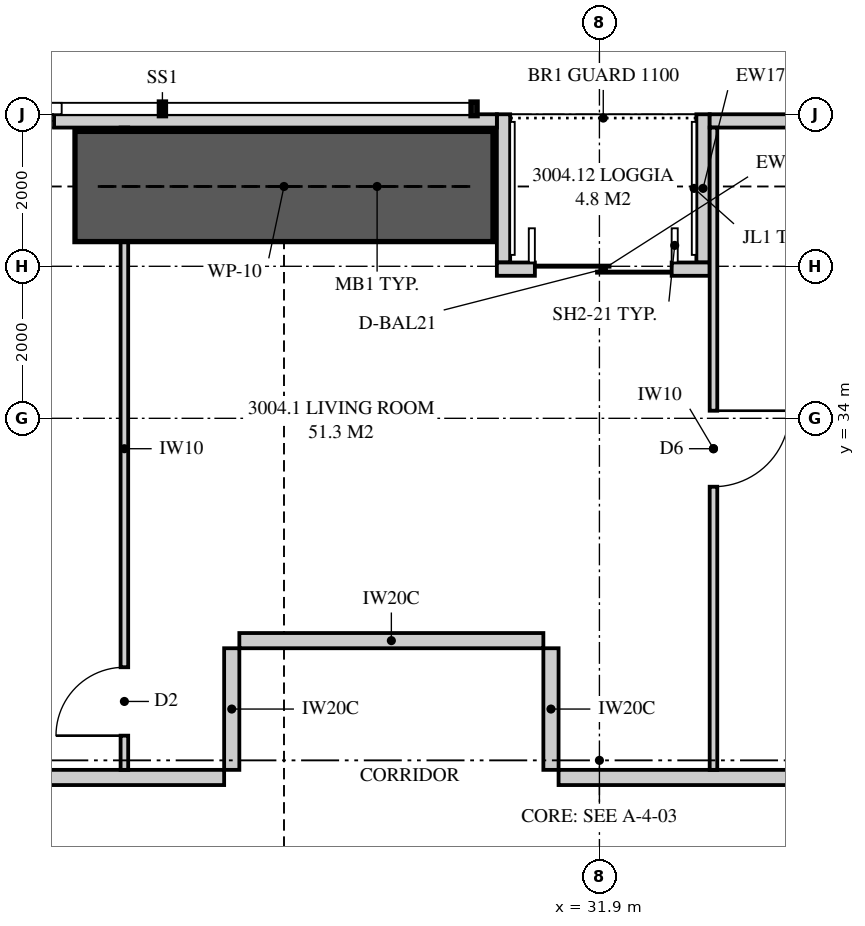
"""IFC4 building model, lengths in metres.
Left out: names, types, materials, properties, quantities, classifications, styles, units other than length and angle.
Written with IfcOpenShell. Run it as: python <this file> out.ifc"""

import sys

from ifc_helpers import new_model, si_unit, direction, frame, frame_2d, origin, place, context, subcontext, project, spatial, polyline, rectangle, outline, extrude, element, fill, save


model = new_model("IFC4")
c1 = context("Model", 3, precision=1e-05, world=origin(), true_north=direction((0.0, 1.0)))
c2 = subcontext(c1, "Body", "Model", "MODEL_VIEW")
j1 = project(units=[si_unit("LENGTHUNIT", "METRE"), si_unit("PLANEANGLEUNIT", "RADIAN")], contexts=[c1])
p1 = place(None, origin())
s1 = spatial("IfcSite", under=j1, at=p1, CompositionType="ELEMENT")
p2 = place(p1, origin())
s2 = spatial("IfcBuilding", under=s1, at=p2, CompositionType="ELEMENT")
p3 = place(p2, frame((0.0, 0.0, 111.55)))
s3 = spatial("IfcBuildingStorey", under=s2, at=p3, CompositionType="ELEMENT", Elevation=111.55)
p4 = place(p3, frame((46.449, 37.913, 0.0), z_axis=(0.0, 0.0, 1.0), x_axis=(-1.0, 0.0, 0.0)))
e1 = element("IfcWall", 1, at=p4, inside=s3, PredefinedType="SOLIDWALL", context=c2, shape_type="SweptSolid", body=[
    extrude(outline(polyline([(0.0, 0.0), (13.098, 0.0), (13.098, 2.15), (7.824, 2.15), (7.824, 3.11), (7.666, 3.11), (7.666, 2.15), (7.62, 2.15), (7.62, 3.11), (0.0, 3.11), (0.0, 0.0)])), frame((0.0, 0.087, 0.0), z_axis=(0.0, -1.0, 0.0), x_axis=(1.0, 0.0, 0.0)), (0.0, 0.0, 1.0), 0.175),
])
p5 = place(p4, frame((2.25, 0.0, 0.4)))
e2 = element("IfcOpeningElement", 2, at=p5, cuts=e1, PredefinedType="OPENING", context=c2, shape_type="SweptSolid", body=[
    extrude(rectangle(XDim=1.2, YDim=1.7, at=frame_2d((0.6, 0.85))), frame((0.0, 0.097, 0.0), z_axis=(0.0, -1.0, 0.0), x_axis=(1.0, 0.0, 0.0)), (0.0, 0.0, 1.0), 0.195),
])
p6 = place(p4, frame((10.798, 0.0, 0.4)))
e3 = element("IfcOpeningElement", 3, at=p6, cuts=e1, PredefinedType="OPENING", context=c2, shape_type="SweptSolid", body=[
    extrude(rectangle(XDim=1.2, YDim=1.7, at=frame_2d((0.6, 0.85))), frame((0.0, 0.097, 0.0), z_axis=(0.0, -1.0, 0.0), x_axis=(1.0, 0.0, 0.0)), (0.0, 0.0, 1.0), 0.195),
])
p7 = place(p3, frame((30.551, 37.913, 0.0), z_axis=(0.0, 0.0, 1.0), x_axis=(-1.0, 0.0, 0.0)))
e4 = element("IfcWall", 4, at=p7, inside=s3, PredefinedType="SOLIDWALL", context=c2, shape_type="SweptSolid", body=[
    extrude(outline(polyline([(0.0, 0.0), (21.499, 0.0), (21.499, 3.11), (13.879, 3.11), (13.879, 2.15), (13.834, 2.15), (13.834, 3.11), (13.676, 3.11), (13.676, 2.15), (0.0, 2.15), (0.0, 0.0)])), frame((0.0, 0.087, 0.0), z_axis=(0.0, -1.0, 0.0), x_axis=(1.0, 0.0, 0.0)), (0.0, 0.0, 1.0), 0.175),
])
p8 = place(p7, frame((5.826, 0.0, 0.4)))
e5 = element("IfcOpeningElement", 5, at=p8, cuts=e4, PredefinedType="OPENING", context=c2, shape_type="SweptSolid", body=[
    extrude(rectangle(XDim=1.8, YDim=1.7, at=frame_2d((0.9, 0.85))), frame((0.0, 0.097, 0.0), z_axis=(0.0, -1.0, 0.0), x_axis=(1.0, 0.0, 0.0)), (0.0, 0.0, 1.0), 0.195),
])
p9 = place(p7, frame((8.993, 0.0, 0.4)))
e6 = element("IfcOpeningElement", 6, at=p9, cuts=e4, PredefinedType="OPENING", context=c2, shape_type="SweptSolid", body=[
    extrude(rectangle(XDim=1.8, YDim=1.7, at=frame_2d((0.9, 0.85))), frame((0.0, 0.097, 0.0), z_axis=(0.0, -1.0, 0.0), x_axis=(1.0, 0.0, 0.0)), (0.0, 0.0, 1.0), 0.195),
])
p10 = place(p7, frame((16.566, 0.0, 0.4)))
e7 = element("IfcOpeningElement", 7, at=p10, cuts=e4, PredefinedType="OPENING", context=c2, shape_type="SweptSolid", body=[
    extrude(rectangle(XDim=1.8, YDim=1.7, at=frame_2d((0.9, 0.85))), frame((0.0, 0.097, 0.0), z_axis=(0.0, -1.0, 0.0), x_axis=(1.0, 0.0, 0.0)), (0.0, 0.0, 1.0), 0.195),
])
p11 = place(p3, frame((33.351, 35.962, 0.0), z_axis=(0.0, 0.0, 1.0), x_axis=(-1.0, 0.0, 0.0)))
e8 = element("IfcWall", 8, at=p11, inside=s3, PredefinedType="SOLIDWALL", context=c2, shape_type="SweptSolid", body=[
    extrude(rectangle(XDim=2.8, YDim=0.175, at=frame_2d((1.4, 0.0))), origin(), (0.0, 0.0, 1.0), 3.11),
])
p12 = place(p11, frame((0.5, 0.0, 0.0)))
e9 = element("IfcOpeningElement", 9, at=p12, cuts=e8, PredefinedType="OPENING", context=c2, shape_type="SweptSolid", body=[
    extrude(rectangle(XDim=1.8, YDim=2.1, at=frame_2d((0.9, 1.05))), frame((0.0, 0.097, 0.0), z_axis=(0.0, -1.0, 0.0), x_axis=(1.0, 0.0, 0.0)), (0.0, 0.0, 1.0), 0.195),
])
for number, where, z_axis, x_axis in (
    (10, (33.263, 38.0, 0.0), (0.0, 0.0, 1.0), (0.0, -1.0, 0.0)),
    (11, (30.638, 38.0, 0.0), (0.0, 0.0, 1.0), (0.0, -1.0, 0.0)),
):
    element("IfcWall", number, at=place(p3, frame(where, z_axis=z_axis, x_axis=x_axis)), inside=s3, PredefinedType="SOLIDWALL", context=c2, shape_type="SweptSolid", body=[
        extrude(outline(polyline([(0.0, 0.0), (1.95, 0.0), (1.95, 3.11), (1.75, 3.11), (1.75, 2.15), (0.15, 2.15), (0.15, 3.11), (0.0, 3.11), (0.0, 0.0)])), frame((0.0, 0.087, 0.0), z_axis=(0.0, -1.0, 0.0), x_axis=(1.0, 0.0, 0.0)), (0.0, 0.0, 1.0), 0.175),
    ])
p13 = place(p3, frame((17.775, 29.275, 0.0), z_axis=(0.0, 0.0, 1.0), x_axis=(1.0, 0.0, 0.0)))
e12 = element("IfcWall", 12, at=p13, inside=s3, PredefinedType="PARTITIONING", context=c2, shape_type="SweptSolid", body=[
    extrude(rectangle(XDim=9.188, YDim=0.2, at=frame_2d((4.594, 0.0))), origin(), (0.0, 0.0, 1.0), 3.11),
])
p14 = place(p13, frame((5.05, 0.0, 0.0)))
e13 = element("IfcOpeningElement", 13, at=p14, cuts=e12, PredefinedType="OPENING", context=c2, shape_type="SweptSolid", body=[
    extrude(rectangle(XDim=1.05, YDim=2.2, at=frame_2d((0.525, 1.1))), frame((0.0, 0.11, 0.0), z_axis=(0.0, -1.0, 0.0), x_axis=(1.0, 0.0, 0.0)), (0.0, 0.0, 1.0), 0.22),
])
p15 = place(p3, frame((25.65, 37.825, 0.0), z_axis=(0.0, 0.0, 1.0), x_axis=(0.0, -1.0, 0.0)))
e14 = element("IfcWall", 14, at=p15, inside=s3, PredefinedType="PARTITIONING", context=c2, shape_type="SweptSolid", body=[
    extrude(outline(polyline([(0.529, 2.15), (0.0, 2.15), (0.0, 0.0), (0.529, 0.0), (0.529, 0.034), (1.021, 0.034), (1.021, 0.0), (8.45, 0.0), (8.45, 3.11), (1.635, 3.11), (1.635, 2.15), (1.021, 2.15), (1.021, 2.116), (0.529, 2.116), (0.529, 2.15)])), frame((0.0, 0.05, 0.0), z_axis=(0.0, -1.0, 0.0), x_axis=(1.0, 0.0, 0.0)), (0.0, 0.0, 1.0), 0.1),
])
p16 = place(p15, frame((7.1, 0.0, 0.0)))
e15 = element("IfcOpeningElement", 15, at=p16, cuts=e14, PredefinedType="OPENING", context=c2, shape_type="SweptSolid", body=[
    extrude(rectangle(XDim=0.9, YDim=2.1, at=frame_2d((0.45, 1.05))), frame((0.0, 0.06, 0.0), z_axis=(0.0, -1.0, 0.0), x_axis=(1.0, 0.0, 0.0)), (0.0, 0.0, 1.0), 0.12),
])
p17 = place(p3, frame((33.401, 37.825, 0.0), z_axis=(0.0, 0.0, 1.0), x_axis=(0.0, -1.0, 0.0)))
e16 = element("IfcWall", 16, at=p17, inside=s3, PredefinedType="PARTITIONING", context=c2, shape_type="SweptSolid", body=[
    extrude(outline(polyline([(0.0, 0.0), (8.45, 0.0), (8.45, 3.11), (1.635, 3.11), (1.635, 2.15), (0.0, 2.15), (0.0, 3.11), (0.0, 0.0)])), frame((0.0, 0.05, 0.0), z_axis=(0.0, -1.0, 0.0), x_axis=(1.0, 0.0, 0.0)), (0.0, 0.0, 1.0), 0.1),
])
p18 = place(p17, frame((3.725, 0.0, 0.0)))
e17 = element("IfcOpeningElement", 17, at=p18, cuts=e16, PredefinedType="OPENING", context=c2, shape_type="SweptSolid", body=[
    extrude(rectangle(XDim=1.0, YDim=2.1, at=frame_2d((0.5, 1.05))), frame((0.0, 0.06, 0.0), z_axis=(0.0, -1.0, 0.0), x_axis=(1.0, 0.0, 0.0)), (0.0, 0.0, 1.0), 0.12),
])
p19 = place(p3, frame((31.363, 29.275, 0.0), z_axis=(0.0, 0.0, 1.0), x_axis=(1.0, 0.0, 0.0)))
e18 = element("IfcWall", 18, at=p19, inside=s3, PredefinedType="PARTITIONING", context=c2, shape_type="SweptSolid", body=[
    extrude(outline(polyline([(0.0, 0.0), (9.188, 0.0), (9.188, 3.11), (7.6, 3.11), (7.6, 2.541), (6.925, 2.541), (6.925, 3.11), (0.0, 3.11), (0.0, 0.0)])), frame((0.0, 0.1, 0.0), z_axis=(0.0, -1.0, 0.0), x_axis=(1.0, 0.0, 0.0)), (0.0, 0.0, 1.0), 0.2),
])
p20 = place(p3, frame((27.163, 31.075, 0.0), z_axis=(0.0, 0.0, 1.0), x_axis=(1.0, 0.0, 0.0)))
e19 = element("IfcWall", 19, at=p20, inside=s3, PredefinedType="PARTITIONING", context=c2, shape_type="SweptSolid", body=[
    extrude(outline(polyline([(0.0, 0.0), (4.0, 0.0), (4.0, 3.11), (0.925, 3.11), (0.925, 2.541), (0.25, 2.541), (0.25, 3.11), (0.0, 3.11), (0.0, 0.0)])), frame((0.0, 0.1, 0.0), z_axis=(0.0, -1.0, 0.0), x_axis=(1.0, 0.0, 0.0)), (0.0, 0.0, 1.0), 0.2),
])
for number, where, z_axis, x_axis in (
    (20, (27.062, 29.375, 0.0), (0.0, 0.0, 1.0), (0.0, 1.0, 0.0)),
    (21, (31.262, 29.375, 0.0), (0.0, 0.0, 1.0), (0.0, 1.0, 0.0)),
):
    element("IfcWall", number, at=place(p3, frame(where, z_axis=z_axis, x_axis=x_axis)), inside=s3, PredefinedType="PARTITIONING", context=c2, shape_type="SweptSolid", body=[
        extrude(rectangle(XDim=1.6, YDim=0.2, at=frame_2d((0.8, 0.0))), origin(), (0.0, 0.0, 1.0), 3.11),
    ])
p21 = place(p3, frame((25.0, 37.05, 0.0), z_axis=(0.0, 0.0, 1.0), x_axis=(1.0, 0.0, 0.0)))
e22 = element("IfcWall", 22, at=p21, inside=s3, PredefinedType="SHEAR", context=c2, shape_type="SweptSolid", body=[
    extrude(rectangle(XDim=5.5, YDim=1.45, at=frame_2d((2.75, 0.0))), origin(), (0.0, 0.0, 1.0), 3.35),
])
p22 = place(p12, origin())
e23 = element("IfcDoor", 23, at=p22, inside=s3, OperationType="SLIDING_TO_LEFT", PredefinedType="DOOR", context=c2, shape_type="SweptSolid", body=[
    extrude(rectangle(XDim=1.8, YDim=2.1, at=frame_2d((0.9, 1.05))), frame((0.0, 0.025, 0.0), z_axis=(0.0, -1.0, 0.0), x_axis=(1.0, 0.0, 0.0)), (0.0, 0.0, 1.0), 0.05),
])
fill(e9, e23)
p23 = place(p8, origin())
e24 = element("IfcWindow", 24, at=p23, inside=s3, PartitioningType="SINGLE_PANEL", PredefinedType="WINDOW", context=c2, shape_type="SweptSolid", body=[
    extrude(rectangle(XDim=1.8, YDim=1.7, at=frame_2d((0.9, 0.85))), frame((0.0, 0.03, 0.0), z_axis=(0.0, -1.0, 0.0), x_axis=(1.0, 0.0, 0.0)), (0.0, 0.0, 1.0), 0.06),
])
fill(e5, e24)
p24 = place(p16, frame((0.9, 0.0, 0.0), z_axis=(0.0, 0.0, 1.0), x_axis=(-1.0, 0.0, 0.0)))
e25 = element("IfcDoor", 25, at=p24, inside=s3, OperationType="SINGLE_SWING_LEFT", PredefinedType="DOOR", context=c2, shape_type="SweptSolid", body=[
    extrude(rectangle(XDim=0.9, YDim=2.1, at=frame_2d((0.45, 1.05))), frame((0.0, 0.025, 0.0), z_axis=(0.0, -1.0, 0.0), x_axis=(1.0, 0.0, 0.0)), (0.0, 0.0, 1.0), 0.05),
])
fill(e15, e25)
p25 = place(p18, origin())
e26 = element("IfcDoor", 26, at=p25, inside=s3, OperationType="SINGLE_SWING_LEFT", PredefinedType="DOOR", context=c2, shape_type="SweptSolid", body=[
    extrude(rectangle(XDim=1.0, YDim=2.1, at=frame_2d((0.5, 1.05))), frame((0.0, 0.025, 0.0), z_axis=(0.0, -1.0, 0.0), x_axis=(1.0, 0.0, 0.0)), (0.0, 0.0, 1.0), 0.05),
])
fill(e17, e26)
save(model, sys.argv[1])
